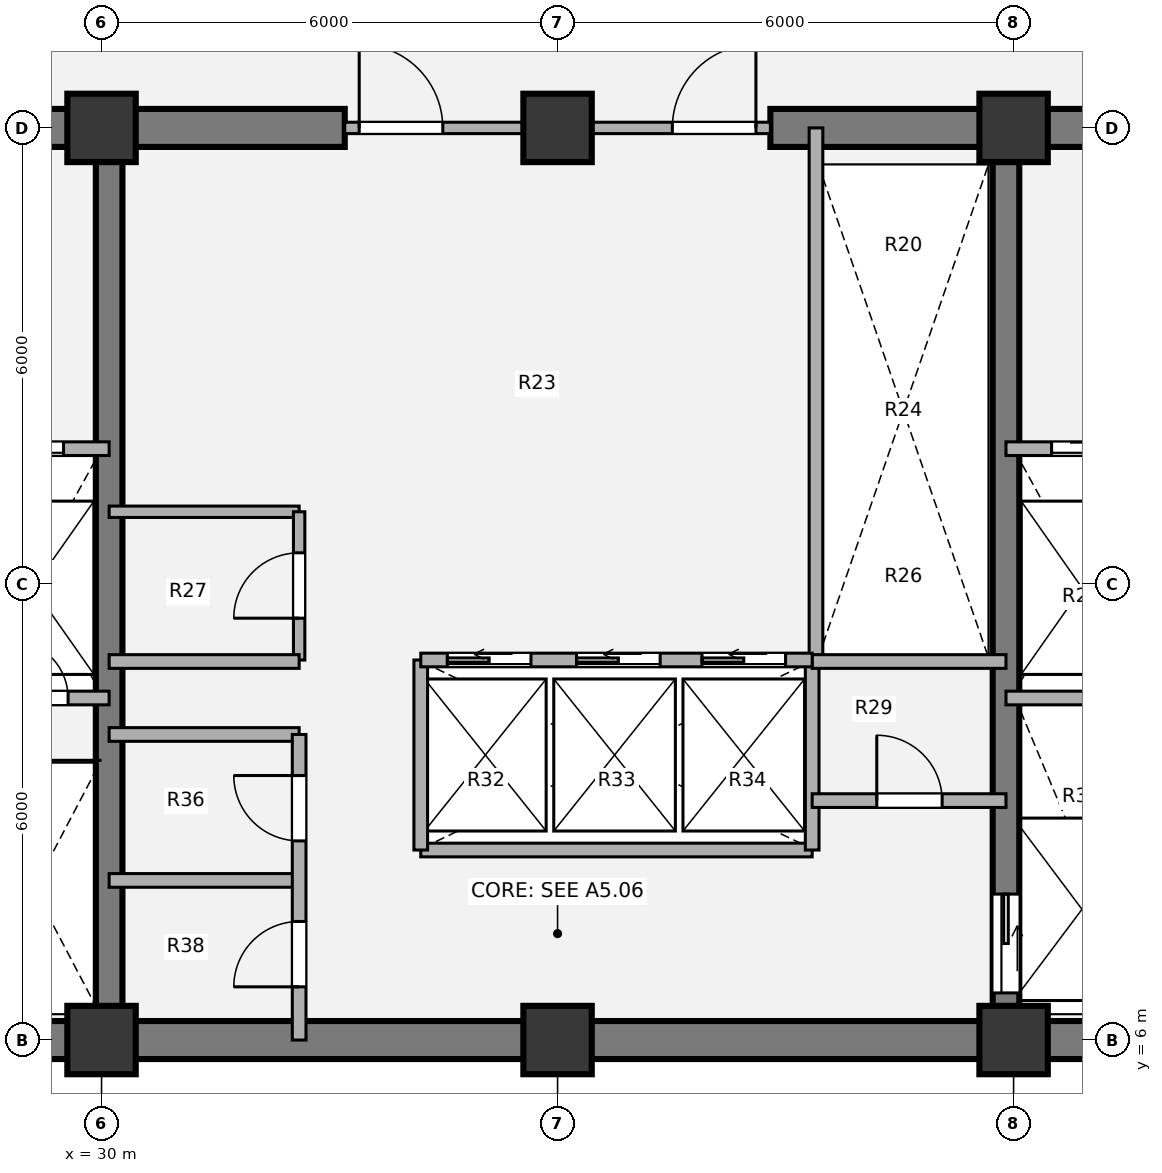
"""IFC4 building model, lengths in metres.
Left out: names, types, materials, properties, quantities, classifications, styles, units other than length and angle.
Written with IfcOpenShell. Run it as: python <this file> out.ifc"""

import sys

from ifc_helpers import new_model, si_unit, direction, frame, frame_2d, origin, origin_2d, place, context, subcontext, project, spatial, rectangle, extrude, source, transform, mapped, element, fill, save


model = new_model("IFC4")
c1 = context("Model", 3, precision=1e-05, world=origin(), true_north=direction((0.0, 1.0)))
c2 = subcontext(c1, "Body", "Model", "MODEL_VIEW")
j1 = project(units=[si_unit("LENGTHUNIT", "METRE"), si_unit("PLANEANGLEUNIT", "RADIAN")], contexts=[c1])
p1 = place(None, origin())
s1 = spatial("IfcSite", under=j1, at=p1, CompositionType="ELEMENT")
p2 = place(p1, origin())
s2 = spatial("IfcBuilding", under=s1, at=p2, CompositionType="ELEMENT")
p3 = place(p2, frame((0.0, 0.0, 142.74)))
s3 = spatial("IfcBuildingStorey", under=s2, at=p3, CompositionType="ELEMENT", Elevation=142.74)
m1 = source(origin(), c2, "Body", "SweptSolid", [
    extrude(rectangle(XDim=0.9, YDim=0.9, at=origin_2d()), origin(), (0.0, 0.0, 1.0), 3.78),
])
for number, where, z_axis, x_axis in (
    (1, (30.0, 6.0, 0.0), (0.0, 0.0, 1.0), (1.0, 0.0, 0.0)),
    (2, (36.0, 6.0, 0.0), (0.0, 0.0, 1.0), (1.0, 0.0, 0.0)),
    (3, (42.0, 6.0, 0.0), (0.0, 0.0, 1.0), (1.0, 0.0, 0.0)),
    (4, (30.0, 18.0, 0.0), (0.0, 0.0, 1.0), (1.0, 0.0, 0.0)),
    (5, (36.0, 18.0, 0.0), (0.0, 0.0, 1.0), (1.0, 0.0, 0.0)),
    (6, (42.0, 18.0, 0.0), (0.0, 0.0, 1.0), (1.0, 0.0, 0.0)),
):
    element("IfcColumn", number, at=place(p3, frame(where, z_axis=z_axis, x_axis=x_axis)), inside=s3, PredefinedType="COLUMN", context=c2, shape_type="MappedRepresentation", body=[
        mapped(m1, transform((0.0, 0.0, 0.0), x_axis=(1.0, 0.0, 0.0), y_axis=(0.0, 1.0, 0.0), z_axis=(0.0, 0.0, 1.0), scale=1.0)),
    ])
p4 = place(p3, frame((48.25, 6.0, 0.0), z_axis=(0.0, 0.0, 1.0), x_axis=(-1.0, 0.0, 0.0)))
e7 = element("IfcWall", 7, at=p4, inside=s3, PredefinedType="SHEAR", context=c2, shape_type="SweptSolid", body=[
    extrude(rectangle(XDim=24.5, YDim=0.5, at=frame_2d((12.25, 0.0))), origin(), (0.0, 0.0, 1.0), 3.78),
])
p5 = place(p3, frame((23.75, 18.0, 0.0), z_axis=(0.0, 0.0, 1.0), x_axis=(1.0, 0.0, 0.0)))
e8 = element("IfcWall", 8, at=p5, inside=s3, PredefinedType="SHEAR", context=c2, shape_type="SweptSolid", body=[
    extrude(rectangle(XDim=9.45, YDim=0.5, at=frame_2d((4.725, 0.0))), origin(), (0.0, 0.0, 1.0), 3.78),
])
p6 = place(p5, frame((2.95, 0.0, 0.0)))
e9 = element("IfcOpeningElement", 9, at=p6, cuts=e8, PredefinedType="OPENING", context=c2, shape_type="SweptSolid", body=[
    extrude(rectangle(XDim=1.1, YDim=2.1, at=origin_2d()), frame((0.55, 0.26, 1.05), z_axis=(0.0, -1.0, 0.0), x_axis=(1.0, 0.0, 0.0)), (0.0, 0.0, 1.0), 0.52),
])
p7 = place(p3, frame((38.8, 18.0, 0.0), z_axis=(0.0, 0.0, 1.0), x_axis=(1.0, 0.0, 0.0)))
e10 = element("IfcWall", 10, at=p7, inside=s3, PredefinedType="SHEAR", context=c2, shape_type="SweptSolid", body=[
    extrude(rectangle(XDim=9.45, YDim=0.5, at=frame_2d((4.725, 0.0))), origin(), (0.0, 0.0, 1.0), 3.78),
])
p8 = place(p7, frame((5.45, 0.0, 0.0)))
e11 = element("IfcOpeningElement", 11, at=p8, cuts=e10, PredefinedType="OPENING", context=c2, shape_type="SweptSolid", body=[
    extrude(rectangle(XDim=1.1, YDim=2.1, at=origin_2d()), frame((0.55, 0.26, 1.05), z_axis=(0.0, -1.0, 0.0), x_axis=(1.0, 0.0, 0.0)), (0.0, 0.0, 1.0), 0.52),
])
p9 = place(p3, frame((30.1, 6.0, 0.0), z_axis=(0.0, 0.0, 1.0), x_axis=(0.0, 1.0, 0.0)))
e12 = element("IfcWall", 12, at=p9, inside=s3, PredefinedType="SHEAR", context=c2, shape_type="SweptSolid", body=[
    extrude(rectangle(XDim=12.0, YDim=0.35, at=frame_2d((6.0, 0.0))), origin(), (0.0, 0.0, 1.0), 3.78),
])
p10 = place(p3, frame((41.9, 18.0, 0.0), z_axis=(0.0, 0.0, 1.0), x_axis=(0.0, -1.0, 0.0)))
e13 = element("IfcWall", 13, at=p10, inside=s3, PredefinedType="SHEAR", context=c2, shape_type="SweptSolid", body=[
    extrude(rectangle(XDim=12.0, YDim=0.35, at=frame_2d((6.0, 0.0))), origin(), (0.0, 0.0, 1.0), 3.78),
])
p11 = place(p10, frame((10.08, 0.0, 0.0)))
e14 = element("IfcOpeningElement", 14, at=p11, cuts=e13, PredefinedType="OPENING", context=c2, shape_type="SweptSolid", body=[
    extrude(rectangle(XDim=1.3, YDim=2.1, at=origin_2d()), frame((0.65, 0.185, 1.05), z_axis=(0.0, -1.0, 0.0), x_axis=(1.0, 0.0, 0.0)), (0.0, 0.0, 1.0), 0.37),
])
p12 = place(p3, frame((30.1, 12.95, 0.0), z_axis=(0.0, 0.0, 1.0), x_axis=(1.0, 0.0, 0.0)))
e15 = element("IfcWall", 15, at=p12, inside=s3, PredefinedType="PARTITIONING", context=c2, shape_type="SweptSolid", body=[
    extrude(rectangle(XDim=2.5, YDim=0.15, at=frame_2d((1.25, 0.0))), origin(), (0.0, 0.0, 1.0), 3.342),
])
p13 = place(p3, frame((32.6, 11.0, 0.0), z_axis=(0.0, 0.0, 1.0), x_axis=(0.0, 1.0, 0.0)))
e16 = element("IfcWall", 16, at=p13, inside=s3, PredefinedType="PARTITIONING", context=c2, shape_type="SweptSolid", body=[
    extrude(rectangle(XDim=1.95, YDim=0.15, at=frame_2d((0.975, 0.0))), origin(), (0.0, 0.0, 1.0), 3.342),
])
p14 = place(p13, frame((0.55, 0.0, 0.0)))
e17 = element("IfcOpeningElement", 17, at=p14, cuts=e16, PredefinedType="OPENING", context=c2, shape_type="SweptSolid", body=[
    extrude(rectangle(XDim=0.86, YDim=2.1, at=origin_2d()), frame((0.43, 0.085, 1.05), z_axis=(0.0, -1.0, 0.0), x_axis=(1.0, 0.0, 0.0)), (0.0, 0.0, 1.0), 0.17),
])
p15 = place(p3, frame((34.2, 8.5, 0.0), z_axis=(0.0, 0.0, 1.0), x_axis=(1.0, 0.0, 0.0)))
e18 = element("IfcWall", 18, at=p15, inside=s3, PredefinedType="PARTITIONING", context=c2, shape_type="SweptSolid", body=[
    extrude(rectangle(XDim=5.15, YDim=0.18, at=frame_2d((2.575, 0.0))), origin(), (0.0, 0.0, 1.0), 3.342),
])
for number, where, z_axis, x_axis in (
    (19, (34.2, 8.5, 0.0), (0.0, 0.0, 1.0), (0.0, 1.0, 0.0)),
    (20, (39.35, 8.5, 0.0), (0.0, 0.0, 1.0), (0.0, 1.0, 0.0)),
):
    element("IfcWall", number, at=place(p3, frame(where, z_axis=z_axis, x_axis=x_axis)), inside=s3, PredefinedType="PARTITIONING", context=c2, shape_type="SweptSolid", body=[
        extrude(rectangle(XDim=2.5, YDim=0.18, at=frame_2d((1.25, 0.0))), origin(), (0.0, 0.0, 1.0), 3.342),
    ])
p16 = place(p3, frame((39.4, 11.0, 0.0), z_axis=(0.0, 0.0, 1.0), x_axis=(0.0, 1.0, 0.0)))
e21 = element("IfcWall", 21, at=p16, inside=s3, PredefinedType="PARTITIONING", context=c2, shape_type="SweptSolid", body=[
    extrude(rectangle(XDim=7.0, YDim=0.18, at=frame_2d((3.5, 0.0))), origin(), (0.0, 0.0, 1.0), 3.342),
])
p17 = place(p3, frame((30.1, 10.98, 0.0), z_axis=(0.0, 0.0, 1.0), x_axis=(1.0, 0.0, 0.0)))
e22 = element("IfcWall", 22, at=p17, inside=s3, PredefinedType="PARTITIONING", context=c2, shape_type="SweptSolid", body=[
    extrude(rectangle(XDim=2.5, YDim=0.18, at=frame_2d((1.25, 0.0))), origin(), (0.0, 0.0, 1.0), 3.342),
])
p18 = place(p3, frame((39.35, 10.98, 0.0), z_axis=(0.0, 0.0, 1.0), x_axis=(1.0, 0.0, 0.0)))
e23 = element("IfcWall", 23, at=p18, inside=s3, PredefinedType="PARTITIONING", context=c2, shape_type="SweptSolid", body=[
    extrude(rectangle(XDim=2.55, YDim=0.18, at=frame_2d((1.275, 0.0))), origin(), (0.0, 0.0, 1.0), 3.342),
])
for number, where, z_axis, x_axis in (
    (24, (30.1, 8.1, 0.0), (0.0, 0.0, 1.0), (1.0, 0.0, 0.0)),
    (25, (30.1, 10.02, 0.0), (0.0, 0.0, 1.0), (1.0, 0.0, 0.0)),
):
    element("IfcWall", number, at=place(p3, frame(where, z_axis=z_axis, x_axis=x_axis)), inside=s3, PredefinedType="PARTITIONING", context=c2, shape_type="SweptSolid", body=[
        extrude(rectangle(XDim=2.5, YDim=0.18, at=frame_2d((1.25, 0.0))), origin(), (0.0, 0.0, 1.0), 3.342),
    ])
p19 = place(p3, frame((32.6, 6.0, 0.0), z_axis=(0.0, 0.0, 1.0), x_axis=(0.0, 1.0, 0.0)))
e26 = element("IfcWall", 26, at=p19, inside=s3, PredefinedType="PARTITIONING", context=c2, shape_type="SweptSolid", body=[
    extrude(rectangle(XDim=4.02, YDim=0.18, at=frame_2d((2.01, 0.0))), origin(), (0.0, 0.0, 1.0), 3.342),
])
p20 = place(p19, frame((0.7, 0.0, 0.0)))
e27 = element("IfcOpeningElement", 27, at=p20, cuts=e26, PredefinedType="OPENING", context=c2, shape_type="SweptSolid", body=[
    extrude(rectangle(XDim=0.86, YDim=2.1, at=origin_2d()), frame((0.43, 0.1, 1.05), z_axis=(0.0, -1.0, 0.0), x_axis=(1.0, 0.0, 0.0)), (0.0, 0.0, 1.0), 0.2),
])
p21 = place(p19, frame((2.62, 0.0, 0.0)))
e28 = element("IfcOpeningElement", 28, at=p21, cuts=e26, PredefinedType="OPENING", context=c2, shape_type="SweptSolid", body=[
    extrude(rectangle(XDim=0.86, YDim=2.1, at=origin_2d()), frame((0.43, 0.1, 1.05), z_axis=(0.0, -1.0, 0.0), x_axis=(1.0, 0.0, 0.0)), (0.0, 0.0, 1.0), 0.2),
])
p22 = place(p3, frame((39.35, 9.15, 0.0), z_axis=(0.0, 0.0, 1.0), x_axis=(1.0, 0.0, 0.0)))
e29 = element("IfcWall", 29, at=p22, inside=s3, PredefinedType="PARTITIONING", context=c2, shape_type="SweptSolid", body=[
    extrude(rectangle(XDim=2.55, YDim=0.18, at=frame_2d((1.275, 0.0))), origin(), (0.0, 0.0, 1.0), 3.342),
])
p23 = place(p22, frame((0.85, 0.0, 0.0)))
e30 = element("IfcOpeningElement", 30, at=p23, cuts=e29, PredefinedType="OPENING", context=c2, shape_type="SweptSolid", body=[
    extrude(rectangle(XDim=0.86, YDim=2.1, at=origin_2d()), frame((0.43, 0.1, 1.05), z_axis=(0.0, -1.0, 0.0), x_axis=(1.0, 0.0, 0.0)), (0.0, 0.0, 1.0), 0.2),
])
p24 = place(p3, frame((33.2, 18.0, 0.0), z_axis=(0.0, 0.0, 1.0), x_axis=(1.0, 0.0, 0.0)))
e31 = element("IfcWall", 31, at=p24, inside=s3, PredefinedType="PARTITIONING", context=c2, shape_type="SweptSolid", body=[
    extrude(rectangle(XDim=5.6, YDim=0.15, at=frame_2d((2.8, 0.0))), origin(), (0.0, 0.0, 1.0), 2.157),
])
p25 = place(p24, frame((0.19, 0.0, 0.0)))
e32 = element("IfcOpeningElement", 32, at=p25, cuts=e31, PredefinedType="OPENING", context=c2, shape_type="SweptSolid", body=[
    extrude(rectangle(XDim=1.1, YDim=2.097, at=origin_2d()), frame((0.55, 0.085, 1.048), z_axis=(0.0, -1.0, 0.0), x_axis=(1.0, 0.0, 0.0)), (0.0, 0.0, 1.0), 0.17),
])
p26 = place(p24, frame((4.31, 0.0, 0.0)))
e33 = element("IfcOpeningElement", 33, at=p26, cuts=e31, PredefinedType="OPENING", context=c2, shape_type="SweptSolid", body=[
    extrude(rectangle(XDim=1.1, YDim=2.097, at=origin_2d()), frame((0.55, 0.085, 1.048), z_axis=(0.0, -1.0, 0.0), x_axis=(1.0, 0.0, 0.0)), (0.0, 0.0, 1.0), 0.17),
])
p27 = place(p3, frame((24.0, 13.78, 0.0), z_axis=(0.0, 0.0, 1.0), x_axis=(1.0, 0.0, 0.0)))
e34 = element("IfcWall", 34, at=p27, inside=s3, PredefinedType="PARTITIONING", context=c2, shape_type="SweptSolid", body=[
    extrude(rectangle(XDim=6.1, YDim=0.18, at=frame_2d((3.05, 0.0))), origin(), (0.0, 0.0, 1.0), 3.342),
])
p28 = place(p27, frame((1.15, 0.0, 0.0)))
e35 = element("IfcOpeningElement", 35, at=p28, cuts=e34, PredefinedType="OPENING", context=c2, shape_type="SweptSolid", body=[
    extrude(rectangle(XDim=1.1, YDim=2.1, at=origin_2d()), frame((0.55, 0.1, 1.05), z_axis=(0.0, -1.0, 0.0), x_axis=(1.0, 0.0, 0.0)), (0.0, 0.0, 1.0), 0.2),
])
p29 = place(p27, frame((4.4, 0.0, 0.0)))
e36 = element("IfcOpeningElement", 36, at=p29, cuts=e34, PredefinedType="OPENING", context=c2, shape_type="SweptSolid", body=[
    extrude(rectangle(XDim=1.1, YDim=2.1, at=origin_2d()), frame((0.55, 0.1, 1.05), z_axis=(0.0, -1.0, 0.0), x_axis=(1.0, 0.0, 0.0)), (0.0, 0.0, 1.0), 0.2),
])
p30 = place(p3, frame((28.15, 10.5, 0.0), z_axis=(0.0, 0.0, 1.0), x_axis=(1.0, 0.0, 0.0)))
e37 = element("IfcWall", 37, at=p30, inside=s3, PredefinedType="PARTITIONING", context=c2, shape_type="SweptSolid", body=[
    extrude(rectangle(XDim=1.95, YDim=0.18, at=frame_2d((0.975, 0.0))), origin(), (0.0, 0.0, 1.0), 3.342),
])
p31 = place(p30, frame((0.65, 0.0, 0.0)))
e38 = element("IfcOpeningElement", 38, at=p31, cuts=e37, PredefinedType="OPENING", context=c2, shape_type="SweptSolid", body=[
    extrude(rectangle(XDim=0.76, YDim=2.05, at=origin_2d()), frame((0.38, 0.1, 1.025), z_axis=(0.0, -1.0, 0.0), x_axis=(1.0, 0.0, 0.0)), (0.0, 0.0, 1.0), 0.2),
])
p32 = place(p3, frame((41.9, 13.78, 0.0), z_axis=(0.0, 0.0, 1.0), x_axis=(1.0, 0.0, 0.0)))
e39 = element("IfcWall", 39, at=p32, inside=s3, PredefinedType="PARTITIONING", context=c2, shape_type="SweptSolid", body=[
    extrude(rectangle(XDim=6.1, YDim=0.18, at=frame_2d((3.05, 0.0))), origin(), (0.0, 0.0, 1.0), 3.342),
])
p33 = place(p32, frame((0.6, 0.0, 0.0)))
e40 = element("IfcOpeningElement", 40, at=p33, cuts=e39, PredefinedType="OPENING", context=c2, shape_type="SweptSolid", body=[
    extrude(rectangle(XDim=1.1, YDim=2.1, at=origin_2d()), frame((0.55, 0.1, 1.05), z_axis=(0.0, -1.0, 0.0), x_axis=(1.0, 0.0, 0.0)), (0.0, 0.0, 1.0), 0.2),
])
p34 = place(p32, frame((3.8, 0.0, 0.0)))
e41 = element("IfcOpeningElement", 41, at=p34, cuts=e39, PredefinedType="OPENING", context=c2, shape_type="SweptSolid", body=[
    extrude(rectangle(XDim=1.1, YDim=2.1, at=origin_2d()), frame((0.55, 0.1, 1.05), z_axis=(0.0, -1.0, 0.0), x_axis=(1.0, 0.0, 0.0)), (0.0, 0.0, 1.0), 0.2),
])
p35 = place(p3, frame((41.9, 10.5, 0.0), z_axis=(0.0, 0.0, 1.0), x_axis=(1.0, 0.0, 0.0)))
e42 = element("IfcWall", 42, at=p35, inside=s3, PredefinedType="PARTITIONING", context=c2, shape_type="SweptSolid", body=[
    extrude(rectangle(XDim=1.95, YDim=0.18, at=frame_2d((0.975, 0.0))), origin(), (0.0, 0.0, 1.0), 3.342),
])
p36 = place(p3, frame((34.2, 11.0, 0.0), z_axis=(0.0, 0.0, 1.0), x_axis=(1.0, 0.0, 0.0)))
e43 = element("IfcWall", 43, at=p36, inside=s3, PredefinedType="PARTITIONING", context=c2, shape_type="SweptSolid", body=[
    extrude(rectangle(XDim=5.15, YDim=0.18, at=frame_2d((2.575, 0.0))), origin(), (0.0, 0.0, 1.0), 3.342),
])
p37 = place(p36, frame((0.35, 0.0, 0.0)))
e44 = element("IfcOpeningElement", 44, at=p37, cuts=e43, PredefinedType="OPENING", context=c2, shape_type="SweptSolid", body=[
    extrude(rectangle(XDim=1.1, YDim=2.1, at=origin_2d()), frame((0.55, 0.1, 1.05), z_axis=(0.0, -1.0, 0.0), x_axis=(1.0, 0.0, 0.0)), (0.0, 0.0, 1.0), 0.2),
])
p38 = place(p36, frame((2.05, 0.0, 0.0)))
e45 = element("IfcOpeningElement", 45, at=p38, cuts=e43, PredefinedType="OPENING", context=c2, shape_type="SweptSolid", body=[
    extrude(rectangle(XDim=1.1, YDim=2.1, at=origin_2d()), frame((0.55, 0.1, 1.05), z_axis=(0.0, -1.0, 0.0), x_axis=(1.0, 0.0, 0.0)), (0.0, 0.0, 1.0), 0.2),
])
p39 = place(p36, frame((3.7, 0.0, 0.0)))
e46 = element("IfcOpeningElement", 46, at=p39, cuts=e43, PredefinedType="OPENING", context=c2, shape_type="SweptSolid", body=[
    extrude(rectangle(XDim=1.1, YDim=2.1, at=origin_2d()), frame((0.55, 0.1, 1.05), z_axis=(0.0, -1.0, 0.0), x_axis=(1.0, 0.0, 0.0)), (0.0, 0.0, 1.0), 0.2),
])
m2 = source(origin(), c2, "Body", "SweptSolid", [
    extrude(rectangle(XDim=0.86, YDim=2.1, at=origin_2d()), frame((0.43, 0.025, 1.05), z_axis=(0.0, -1.0, 0.0), x_axis=(1.0, 0.0, 0.0)), (0.0, 0.0, 1.0), 0.05),
])
p40 = place(p14, origin())
e47 = element("IfcDoor", 47, at=p40, inside=s3, OperationType="SINGLE_SWING_LEFT", PredefinedType="DOOR", context=c2, shape_type="MappedRepresentation", body=[
    mapped(m2, transform((0.0, 0.0, 0.0), x_axis=(1.0, 0.0, 0.0), y_axis=(0.0, 1.0, 0.0), z_axis=(0.0, 0.0, 1.0), scale=1.0)),
])
fill(e17, e47)
p41 = place(p20, origin())
e48 = element("IfcDoor", 48, at=p41, inside=s3, OperationType="SINGLE_SWING_LEFT", PredefinedType="DOOR", context=c2, shape_type="MappedRepresentation", body=[
    mapped(m2, transform((0.0, 0.0, 0.0), x_axis=(1.0, 0.0, 0.0), y_axis=(0.0, 1.0, 0.0), z_axis=(0.0, 0.0, 1.0), scale=1.0)),
])
fill(e27, e48)
p42 = place(p21, origin())
e49 = element("IfcDoor", 49, at=p42, inside=s3, OperationType="SINGLE_SWING_RIGHT", PredefinedType="DOOR", context=c2, shape_type="MappedRepresentation", body=[
    mapped(m2, transform((0.0, 0.0, 0.0), x_axis=(1.0, 0.0, 0.0), y_axis=(0.0, 1.0, 0.0), z_axis=(0.0, 0.0, 1.0), scale=1.0)),
])
fill(e28, e49)
p43 = place(p23, origin())
e50 = element("IfcDoor", 50, at=p43, inside=s3, OperationType="SINGLE_SWING_LEFT", PredefinedType="DOOR", context=c2, shape_type="MappedRepresentation", body=[
    mapped(m2, transform((0.0, 0.0, 0.0), x_axis=(1.0, 0.0, 0.0), y_axis=(0.0, 1.0, 0.0), z_axis=(0.0, 0.0, 1.0), scale=1.0)),
])
fill(e30, e50)
m3 = source(origin(), c2, "Body", "SweptSolid", [
    extrude(rectangle(XDim=1.1, YDim=2.097, at=origin_2d()), frame((0.55, 0.025, 1.048), z_axis=(0.0, -1.0, 0.0), x_axis=(1.0, 0.0, 0.0)), (0.0, 0.0, 1.0), 0.05),
])
p44 = place(p25, origin())
e51 = element("IfcDoor", 51, at=p44, inside=s3, OperationType="SINGLE_SWING_LEFT", PredefinedType="DOOR", context=c2, shape_type="MappedRepresentation", body=[
    mapped(m3, transform((0.0, 0.0, 0.0), x_axis=(1.0, 0.0, 0.0), y_axis=(0.0, 1.0, 0.0), z_axis=(0.0, 0.0, 1.0), scale=1.0)),
])
fill(e32, e51)
p45 = place(p26, origin())
e52 = element("IfcDoor", 52, at=p45, inside=s3, OperationType="SINGLE_SWING_RIGHT", PredefinedType="DOOR", context=c2, shape_type="MappedRepresentation", body=[
    mapped(m3, transform((0.0, 0.0, 0.0), x_axis=(1.0, 0.0, 0.0), y_axis=(0.0, 1.0, 0.0), z_axis=(0.0, 0.0, 1.0), scale=1.0)),
])
fill(e33, e52)
m4 = source(origin(), c2, "Body", "SweptSolid", [
    extrude(rectangle(XDim=1.1, YDim=2.1, at=origin_2d()), frame((0.55, 0.025, 1.05), z_axis=(0.0, -1.0, 0.0), x_axis=(1.0, 0.0, 0.0)), (0.0, 0.0, 1.0), 0.05),
])
p46 = place(p29, origin())
e53 = element("IfcDoor", 53, at=p46, inside=s3, OperationType="SLIDING_TO_LEFT", PredefinedType="DOOR", context=c2, shape_type="MappedRepresentation", body=[
    mapped(m4, transform((0.0, 0.0, 0.0), x_axis=(1.0, 0.0, 0.0), y_axis=(0.0, 1.0, 0.0), z_axis=(0.0, 0.0, 1.0), scale=1.0)),
])
fill(e36, e53)
m5 = source(origin(), c2, "Body", "SweptSolid", [
    extrude(rectangle(XDim=0.76, YDim=2.05, at=origin_2d()), frame((0.38, 0.025, 1.025), z_axis=(0.0, -1.0, 0.0), x_axis=(1.0, 0.0, 0.0)), (0.0, 0.0, 1.0), 0.05),
])
p47 = place(p31, origin())
e54 = element("IfcDoor", 54, at=p47, inside=s3, OperationType="SINGLE_SWING_LEFT", PredefinedType="DOOR", context=c2, shape_type="MappedRepresentation", body=[
    mapped(m5, transform((0.0, 0.0, 0.0), x_axis=(1.0, 0.0, 0.0), y_axis=(0.0, 1.0, 0.0), z_axis=(0.0, 0.0, 1.0), scale=1.0)),
])
fill(e38, e54)
p48 = place(p33, origin())
e55 = element("IfcDoor", 55, at=p48, inside=s3, OperationType="SLIDING_TO_RIGHT", PredefinedType="DOOR", context=c2, shape_type="MappedRepresentation", body=[
    mapped(m4, transform((0.0, 0.0, 0.0), x_axis=(1.0, 0.0, 0.0), y_axis=(0.0, 1.0, 0.0), z_axis=(0.0, 0.0, 1.0), scale=1.0)),
])
fill(e40, e55)
m6 = source(origin(), c2, "Body", "SweptSolid", [
    extrude(rectangle(XDim=1.3, YDim=2.1, at=origin_2d()), frame((0.65, 0.025, 1.05), z_axis=(0.0, -1.0, 0.0), x_axis=(1.0, 0.0, 0.0)), (0.0, 0.0, 1.0), 0.05),
])
p49 = place(p11, origin())
e56 = element("IfcDoor", 56, at=p49, inside=s3, OperationType="SLIDING_TO_LEFT", PredefinedType="DOOR", context=c2, shape_type="MappedRepresentation", body=[
    mapped(m6, transform((0.0, 0.0, 0.0), x_axis=(1.0, 0.0, 0.0), y_axis=(0.0, 1.0, 0.0), z_axis=(0.0, 0.0, 1.0), scale=1.0)),
])
fill(e14, e56)
p50 = place(p37, origin())
e57 = element("IfcDoor", 57, at=p50, inside=s3, OperationType="SLIDING_TO_LEFT", PredefinedType="DOOR", context=c2, shape_type="MappedRepresentation", body=[
    mapped(m4, transform((0.0, 0.0, 0.0), x_axis=(1.0, 0.0, 0.0), y_axis=(0.0, 1.0, 0.0), z_axis=(0.0, 0.0, 1.0), scale=1.0)),
])
fill(e44, e57)
p51 = place(p38, origin())
e58 = element("IfcDoor", 58, at=p51, inside=s3, OperationType="SLIDING_TO_LEFT", PredefinedType="DOOR", context=c2, shape_type="MappedRepresentation", body=[
    mapped(m4, transform((0.0, 0.0, 0.0), x_axis=(1.0, 0.0, 0.0), y_axis=(0.0, 1.0, 0.0), z_axis=(0.0, 0.0, 1.0), scale=1.0)),
])
fill(e45, e58)
p52 = place(p39, origin())
e59 = element("IfcDoor", 59, at=p52, inside=s3, OperationType="SLIDING_TO_LEFT", PredefinedType="DOOR", context=c2, shape_type="MappedRepresentation", body=[
    mapped(m4, transform((0.0, 0.0, 0.0), x_axis=(1.0, 0.0, 0.0), y_axis=(0.0, 1.0, 0.0), z_axis=(0.0, 0.0, 1.0), scale=1.0)),
])
fill(e46, e59)
save(model, sys.argv[1])
